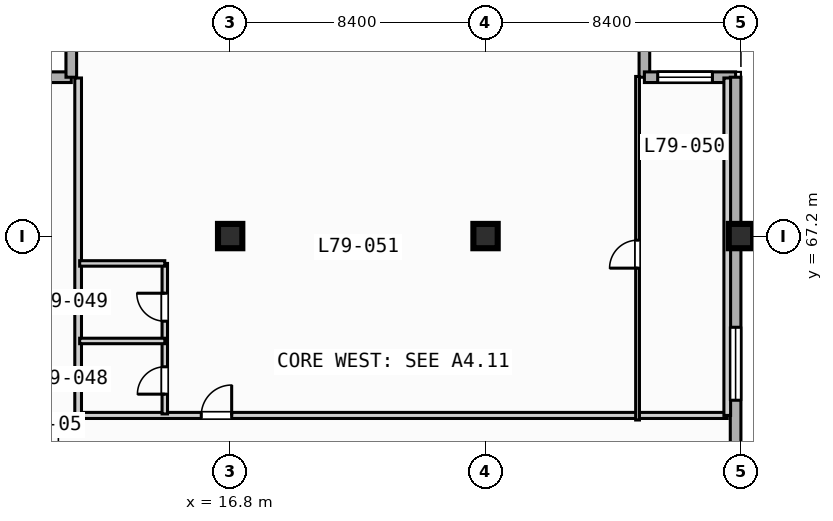
"""IFC4 building model, lengths in metres.
Left out: names, types, materials, properties, quantities, classifications, styles, units other than length and angle.
Written with IfcOpenShell. Run it as: python <this file> out.ifc"""

import sys

from ifc_helpers import new_model, si_unit, direction, frame, frame_2d, origin, origin_2d, place, context, subcontext, project, spatial, rectangle, extrude, element, fill, save


model = new_model("IFC4")
c1 = context("Model", 3, precision=1e-05, world=origin(), true_north=direction((0.0, 1.0)))
c2 = subcontext(c1, "Body", "Model", "MODEL_VIEW")
j1 = project(units=[si_unit("LENGTHUNIT", "METRE"), si_unit("PLANEANGLEUNIT", "RADIAN")], contexts=[c1])
p1 = place(None, origin())
s1 = spatial("IfcSite", under=j1, at=p1, CompositionType="ELEMENT")
p2 = place(p1, origin())
s2 = spatial("IfcBuilding", under=s1, at=p2, CompositionType="ELEMENT")
p3 = place(p2, frame((0.0, 0.0, 320.3)))
s3 = spatial("IfcBuildingStorey", under=s2, at=p3, CompositionType="ELEMENT", Elevation=320.3)
for number, where, z_axis, x_axis in (
    (1, (16.8, 67.2, 0.0), (0.0, 0.0, 1.0), (1.0, 0.0, 0.0)),
    (2, (25.2, 67.2, 0.0), (0.0, 0.0, 1.0), (1.0, 0.0, 0.0)),
    (3, (33.6, 67.2, 0.0), (0.0, 0.0, 1.0), (1.0, 0.0, 0.0)),
):
    element("IfcColumn", number, at=place(p3, frame(where, z_axis=z_axis, x_axis=x_axis)), inside=s3, PredefinedType="COLUMN", context=c2, shape_type="SweptSolid", body=[
        extrude(rectangle(XDim=0.8, YDim=0.8, at=origin_2d()), origin(), (0.0, 0.0, 1.0), 3.9),
    ])
for number, where, z_axis, x_axis in (
    (4, (8.575, 72.425, 0.0), (0.0, 0.0, 1.0), (1.0, 0.0, 0.0)),
    (5, (11.575, 72.425, 0.0), (0.0, 0.0, 1.0), (0.0, 1.0, 0.0)),
    (6, (30.425, 75.425, 0.0), (0.0, 0.0, 1.0), (0.0, -1.0, 0.0)),
):
    element("IfcWall", number, at=place(p3, frame(where, z_axis=z_axis, x_axis=x_axis)), inside=s3, PredefinedType="STANDARD", context=c2, shape_type="SweptSolid", body=[
        extrude(rectangle(XDim=3.0, YDim=0.35, at=frame_2d((1.5, 0.0))), origin(), (0.0, 0.0, 1.0), 3.67),
    ])
p4 = place(p3, frame((30.425, 72.425, 0.0), z_axis=(0.0, 0.0, 1.0), x_axis=(1.0, 0.0, 0.0)))
e7 = element("IfcWall", 7, at=p4, inside=s3, PredefinedType="STANDARD", context=c2, shape_type="SweptSolid", body=[
    extrude(rectangle(XDim=3.0, YDim=0.35, at=frame_2d((1.5, 0.0))), origin(), (0.0, 0.0, 1.0), 3.67),
])
p5 = place(p4, frame((0.438, 0.0, 0.85)))
e8 = element("IfcOpeningElement", 8, at=p5, cuts=e7, PredefinedType="OPENING", context=c2, shape_type="SweptSolid", body=[
    extrude(rectangle(XDim=1.8, YDim=1.8, at=frame_2d((0.9, 0.9))), frame((0.0, 0.185, 0.0), z_axis=(0.0, -1.0, 0.0), x_axis=(1.0, 0.0, 0.0)), (0.0, 0.0, 1.0), 0.37),
])
p6 = place(p3, frame((33.425, 72.425, 0.0), z_axis=(0.0, 0.0, 1.0), x_axis=(0.0, -1.0, 0.0)))
e9 = element("IfcWall", 9, at=p6, inside=s3, PredefinedType="STANDARD", context=c2, shape_type="SweptSolid", body=[
    extrude(rectangle(XDim=39.0, YDim=0.35, at=frame_2d((19.5, 0.0))), origin(), (0.0, 0.0, 1.0), 3.67),
])
p7 = place(p6, frame((33.725, 0.0, 0.85)))
e10 = element("IfcOpeningElement", 10, at=p7, cuts=e9, PredefinedType="OPENING", context=c2, shape_type="SweptSolid", body=[
    extrude(rectangle(XDim=1.8, YDim=1.8, at=frame_2d((0.9, 0.9))), frame((0.0, 0.185, 0.0), z_axis=(0.0, -1.0, 0.0), x_axis=(1.0, 0.0, 0.0)), (0.0, 0.0, 1.0), 0.37),
])
p8 = place(p6, frame((8.225, 0.0, 0.85)))
e11 = element("IfcOpeningElement", 11, at=p8, cuts=e9, PredefinedType="OPENING", context=c2, shape_type="SweptSolid", body=[
    extrude(rectangle(XDim=2.4, YDim=1.95, at=frame_2d((1.2, 0.975))), frame((0.0, 0.185, 0.0), z_axis=(0.0, -1.0, 0.0), x_axis=(1.0, 0.0, 0.0)), (0.0, 0.0, 1.0), 0.37),
])
p9 = place(p3, frame((11.8, 61.3, 0.0), z_axis=(0.0, 0.0, 1.0), x_axis=(1.0, 0.0, 0.0)))
e12 = element("IfcWall", 12, at=p9, inside=s3, PredefinedType="PARTITIONING", context=c2, shape_type="SweptSolid", body=[
    extrude(rectangle(XDim=21.35, YDim=0.2, at=frame_2d((10.675, 0.0))), origin(), (0.0, 0.0, 1.0), 3.67),
])
p10 = place(p9, frame((4.05, 0.0, 0.0)))
e13 = element("IfcOpeningElement", 13, at=p10, cuts=e12, PredefinedType="OPENING", context=c2, shape_type="SweptSolid", body=[
    extrude(rectangle(XDim=1.0, YDim=2.15, at=frame_2d((0.5, 1.075))), frame((0.0, 0.11, 0.0), z_axis=(0.0, -1.0, 0.0), x_axis=(1.0, 0.0, 0.0)), (0.0, 0.0, 1.0), 0.22),
])
for number, where, z_axis, x_axis in (
    (14, (33.15, 61.3, 0.0), (0.0, 0.0, 1.0), (0.0, 1.0, 0.0)),
    (15, (11.8, 61.3, 0.0), (0.0, 0.0, 1.0), (0.0, 1.0, 0.0)),
):
    element("IfcWall", number, at=place(p3, frame(where, z_axis=z_axis, x_axis=x_axis)), inside=s3, PredefinedType="PARTITIONING", context=c2, shape_type="SweptSolid", body=[
        extrude(rectangle(XDim=11.1, YDim=0.22, at=frame_2d((5.55, 0.0))), origin(), (0.0, 0.0, 1.0), 3.67),
    ])
p11 = place(p3, frame((14.65, 61.35, 0.0), z_axis=(0.0, 0.0, 1.0), x_axis=(0.0, 1.0, 0.0)))
e16 = element("IfcWall", 16, at=p11, inside=s3, PredefinedType="PLUMBINGWALL", context=c2, shape_type="SweptSolid", body=[
    extrude(rectangle(XDim=4.95, YDim=0.18, at=frame_2d((2.475, 0.0))), origin(), (0.0, 0.0, 1.0), 3.67),
])
p12 = place(p11, frame((0.65, 0.0, 0.0)))
e17 = element("IfcOpeningElement", 17, at=p12, cuts=e16, PredefinedType="OPENING", context=c2, shape_type="SweptSolid", body=[
    extrude(rectangle(XDim=0.9, YDim=2.1, at=frame_2d((0.45, 1.05))), frame((0.0, 0.1, 0.0), z_axis=(0.0, -1.0, 0.0), x_axis=(1.0, 0.0, 0.0)), (0.0, 0.0, 1.0), 0.2),
])
p13 = place(p11, frame((3.05, 0.0, 0.0)))
e18 = element("IfcOpeningElement", 18, at=p13, cuts=e16, PredefinedType="OPENING", context=c2, shape_type="SweptSolid", body=[
    extrude(rectangle(XDim=0.92, YDim=2.1, at=frame_2d((0.46, 1.05))), frame((0.0, 0.1, 0.0), z_axis=(0.0, -1.0, 0.0), x_axis=(1.0, 0.0, 0.0)), (0.0, 0.0, 1.0), 0.2),
])
for number, where, z_axis, x_axis in (
    (19, (11.85, 63.75, 0.0), (0.0, 0.0, 1.0), (1.0, 0.0, 0.0)),
    (20, (11.85, 66.3, 0.0), (0.0, 0.0, 1.0), (1.0, 0.0, 0.0)),
):
    element("IfcWall", number, at=place(p3, frame(where, z_axis=z_axis, x_axis=x_axis)), inside=s3, PredefinedType="PLUMBINGWALL", context=c2, shape_type="SweptSolid", body=[
        extrude(rectangle(XDim=2.8, YDim=0.18, at=frame_2d((1.4, 0.0))), origin(), (0.0, 0.0, 1.0), 3.67),
    ])
p14 = place(p3, frame((30.2, 61.15, 0.0), z_axis=(0.0, 0.0, 1.0), x_axis=(0.0, 1.0, 0.0)))
e21 = element("IfcWall", 21, at=p14, inside=s3, PredefinedType="PARTITIONING", context=c2, shape_type="SweptSolid", body=[
    extrude(rectangle(XDim=11.3, YDim=0.125, at=frame_2d((5.65, 0.0))), origin(), (0.0, 0.0, 1.0), 3.67),
])
p15 = place(p14, frame((4.995, 0.0, 0.0)))
e22 = element("IfcOpeningElement", 22, at=p15, cuts=e21, PredefinedType="OPENING", context=c2, shape_type="SweptSolid", body=[
    extrude(rectangle(XDim=0.92, YDim=2.1, at=frame_2d((0.46, 1.05))), frame((0.0, 0.073, 0.0), z_axis=(0.0, -1.0, 0.0), x_axis=(1.0, 0.0, 0.0)), (0.0, 0.0, 1.0), 0.145),
])
p16 = place(p5, origin())
e23 = element("IfcWindow", 23, at=p16, inside=s3, PartitioningType="SINGLE_PANEL", PredefinedType="WINDOW", context=c2, shape_type="SweptSolid", body=[
    extrude(rectangle(XDim=1.8, YDim=1.8, at=frame_2d((0.9, 0.9))), frame((0.0, 0.03, 0.0), z_axis=(0.0, -1.0, 0.0), x_axis=(1.0, 0.0, 0.0)), (0.0, 0.0, 1.0), 0.06),
])
fill(e8, e23)
p17 = place(p8, origin())
e24 = element("IfcWindow", 24, at=p17, inside=s3, PartitioningType="SINGLE_PANEL", PredefinedType="WINDOW", context=c2, shape_type="SweptSolid", body=[
    extrude(rectangle(XDim=2.4, YDim=1.95, at=frame_2d((1.2, 0.975))), frame((0.0, 0.03, 0.0), z_axis=(0.0, -1.0, 0.0), x_axis=(1.0, 0.0, 0.0)), (0.0, 0.0, 1.0), 0.06),
])
fill(e11, e24)
p18 = place(p10, origin())
e25 = element("IfcDoor", 25, at=p18, inside=s3, OperationType="SINGLE_SWING_RIGHT", PredefinedType="DOOR", context=c2, shape_type="SweptSolid", body=[
    extrude(rectangle(XDim=1.0, YDim=2.15, at=frame_2d((0.5, 1.075))), frame((0.0, 0.025, 0.0), z_axis=(0.0, -1.0, 0.0), x_axis=(1.0, 0.0, 0.0)), (0.0, 0.0, 1.0), 0.05),
])
fill(e13, e25)
p19 = place(p12, origin())
e26 = element("IfcDoor", 26, at=p19, inside=s3, OperationType="SINGLE_SWING_LEFT", PredefinedType="DOOR", context=c2, shape_type="SweptSolid", body=[
    extrude(rectangle(XDim=0.9, YDim=2.1, at=frame_2d((0.45, 1.05))), frame((0.0, 0.025, 0.0), z_axis=(0.0, -1.0, 0.0), x_axis=(1.0, 0.0, 0.0)), (0.0, 0.0, 1.0), 0.05),
])
fill(e17, e26)
p20 = place(p13, origin())
e27 = element("IfcDoor", 27, at=p20, inside=s3, OperationType="SINGLE_SWING_RIGHT", PredefinedType="DOOR", context=c2, shape_type="SweptSolid", body=[
    extrude(rectangle(XDim=0.92, YDim=2.1, at=frame_2d((0.46, 1.05))), frame((0.0, 0.025, 0.0), z_axis=(0.0, -1.0, 0.0), x_axis=(1.0, 0.0, 0.0)), (0.0, 0.0, 1.0), 0.05),
])
fill(e18, e27)
p21 = place(p15, origin())
e28 = element("IfcDoor", 28, at=p21, inside=s3, OperationType="SINGLE_SWING_LEFT", PredefinedType="DOOR", context=c2, shape_type="SweptSolid", body=[
    extrude(rectangle(XDim=0.92, YDim=2.1, at=frame_2d((0.46, 1.05))), frame((0.0, 0.025, 0.0), z_axis=(0.0, -1.0, 0.0), x_axis=(1.0, 0.0, 0.0)), (0.0, 0.0, 1.0), 0.05),
])
fill(e22, e28)
save(model, sys.argv[1])
